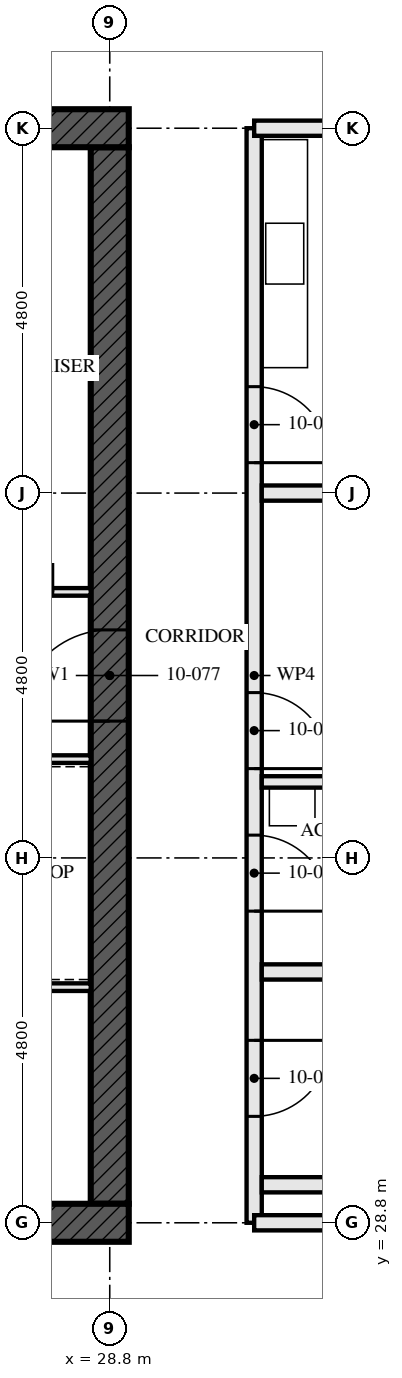
"""IFC4 building model, lengths in metres.
Left out: names, types, materials, properties, quantities, classifications, styles, units other than length and angle.
Written with IfcOpenShell. Run it as: python <this file> out.ifc"""

import sys

from ifc_helpers import new_model, si_unit, direction, frame, frame_2d, origin, place, context, subcontext, project, spatial, rectangle, extrude, element, fill, save


model = new_model("IFC4")
c1 = context("Model", 3, precision=1e-05, world=origin(), true_north=direction((0.0, 1.0)))
c2 = subcontext(c1, "Body", "Model", "MODEL_VIEW")
j1 = project(units=[si_unit("LENGTHUNIT", "METRE"), si_unit("PLANEANGLEUNIT", "RADIAN")], contexts=[c1])
p1 = place(None, origin())
s1 = spatial("IfcSite", under=j1, at=p1, CompositionType="ELEMENT")
p2 = place(p1, origin())
s2 = spatial("IfcBuilding", under=s1, at=p2, CompositionType="ELEMENT")
p3 = place(p2, frame((0.0, 0.0, 41.0)))
s3 = spatial("IfcBuildingStorey", under=s2, at=p3, CompositionType="ELEMENT", Elevation=41.0)
p4 = place(p3, frame((14.15, 28.8, -0.17), z_axis=(0.0, 0.0, 1.0), x_axis=(1.0, 0.0, 0.0)))
e1 = element("IfcWall", 1, at=p4, inside=s3, PredefinedType="SHEAR", context=c2, shape_type="SweptSolid", body=[
    extrude(rectangle(XDim=14.9, YDim=0.5, at=frame_2d((7.45, 0.0))), origin(), (0.0, 0.0, 1.0), 3.5),
])
p5 = place(p4, frame((6.85, 0.0, 0.17)))
e2 = element("IfcOpeningElement", 2, at=p5, cuts=e1, PredefinedType="OPENING", context=c2, shape_type="SweptSolid", body=[
    extrude(rectangle(XDim=1.2, YDim=2.1, at=frame_2d((0.6, 1.05))), frame((0.0, 0.26, 0.0), z_axis=(0.0, -1.0, 0.0), x_axis=(1.0, 0.0, 0.0)), (0.0, 0.0, 1.0), 0.521),
])
p6 = place(p3, frame((29.05, 43.2, -0.17), z_axis=(0.0, 0.0, 1.0), x_axis=(-1.0, 0.0, 0.0)))
e3 = element("IfcWall", 3, at=p6, inside=s3, PredefinedType="SHEAR", context=c2, shape_type="SweptSolid", body=[
    extrude(rectangle(XDim=14.9, YDim=0.5, at=frame_2d((7.45, 0.0))), origin(), (0.0, 0.0, 1.0), 3.5),
])
p7 = place(p6, frame((6.85, 0.0, 0.17)))
e4 = element("IfcOpeningElement", 4, at=p7, cuts=e3, PredefinedType="OPENING", context=c2, shape_type="SweptSolid", body=[
    extrude(rectangle(XDim=1.2, YDim=2.1, at=frame_2d((0.6, 1.05))), frame((0.0, 0.26, 0.0), z_axis=(0.0, -1.0, 0.0), x_axis=(1.0, 0.0, 0.0)), (0.0, 0.0, 1.0), 0.521),
])
p8 = place(p3, frame((28.8, 29.05, -0.17), z_axis=(0.0, 0.0, 1.0), x_axis=(0.0, 1.0, 0.0)))
e5 = element("IfcWall", 5, at=p8, inside=s3, PredefinedType="SHEAR", context=c2, shape_type="SweptSolid", body=[
    extrude(rectangle(XDim=13.9, YDim=0.5, at=frame_2d((6.95, 0.0))), origin(), (0.0, 0.0, 1.0), 3.5),
])
p9 = place(p8, frame((6.35, 0.0, 0.17)))
e6 = element("IfcOpeningElement", 6, at=p9, cuts=e5, PredefinedType="OPENING", context=c2, shape_type="SweptSolid", body=[
    extrude(rectangle(XDim=1.2, YDim=2.1, at=frame_2d((0.6, 1.05))), frame((0.0, 0.26, 0.0), z_axis=(0.0, -1.0, 0.0), x_axis=(1.0, 0.0, 0.0)), (0.0, 0.0, 1.0), 0.521),
])
for number, where, z_axis, x_axis in (
    (7, (35.5, 29.3, 0.0), (0.0, 0.0, 1.0), (-1.0, 0.0, 0.0)),
    (8, (35.5, 32.1, 0.0), (0.0, 0.0, 1.0), (-1.0, 0.0, 0.0)),
):
    element("IfcWall", number, at=place(p3, frame(where, z_axis=z_axis, x_axis=x_axis)), inside=s3, PredefinedType="SOLIDWALL", context=c2, shape_type="SweptSolid", body=[
        extrude(rectangle(XDim=4.7, YDim=0.2, at=frame_2d((2.35, 0.0))), origin(), (0.0, 0.0, 1.0), 2.99),
    ])
p10 = place(p3, frame((33.8, 34.6, 0.0), z_axis=(0.0, 0.0, 1.0), x_axis=(-1.0, 0.0, 0.0)))
e9 = element("IfcWall", 9, at=p10, inside=s3, PredefinedType="PARTITIONING", context=c2, shape_type="SweptSolid", body=[
    extrude(rectangle(XDim=3.0, YDim=0.15, at=frame_2d((1.5, 0.0))), origin(), (0.0, 0.0, 1.0), 3.33),
])
p11 = place(p3, frame((42.805, 38.4, 0.0), z_axis=(0.0, 0.0, 1.0), x_axis=(-1.0, 0.0, 0.0)))
e10 = element("IfcWall", 10, at=p11, inside=s3, PredefinedType="PARTITIONING", context=c2, shape_type="SweptSolid", body=[
    extrude(rectangle(XDim=12.005, YDim=0.2, at=frame_2d((6.002, 0.0))), origin(), (0.0, 0.0, 1.0), 2.55),
])
p12 = place(p3, frame((30.7, 28.8, 0.0), z_axis=(0.0, 0.0, 1.0), x_axis=(0.0, 1.0, 0.0)))
e11 = element("IfcWall", 11, at=p12, inside=s3, PredefinedType="PARTITIONING", context=c2, shape_type="SweptSolid", body=[
    extrude(rectangle(XDim=14.4, YDim=0.2, at=frame_2d((7.2, 0.0))), origin(), (0.0, 0.0, 1.0), 2.55),
])
p13 = place(p12, frame((1.4, 0.0, 0.0)))
e12 = element("IfcOpeningElement", 12, at=p13, cuts=e11, PredefinedType="OPENING", context=c2, shape_type="SweptSolid", body=[
    extrude(rectangle(XDim=1.0, YDim=2.1, at=frame_2d((0.5, 1.05))), frame((0.0, 0.111, 0.0), z_axis=(0.0, -1.0, 0.0), x_axis=(1.0, 0.0, 0.0)), (0.0, 0.0, 1.0), 0.221),
])
p14 = place(p12, frame((4.1, 0.0, 0.0)))
e13 = element("IfcOpeningElement", 13, at=p14, cuts=e11, PredefinedType="OPENING", context=c2, shape_type="SweptSolid", body=[
    extrude(rectangle(XDim=1.0, YDim=2.1, at=frame_2d((0.5, 1.05))), frame((0.0, 0.111, 0.0), z_axis=(0.0, -1.0, 0.0), x_axis=(1.0, 0.0, 0.0)), (0.0, 0.0, 1.0), 0.221),
])
p15 = place(p12, frame((5.975, 0.0, 0.0)))
e14 = element("IfcOpeningElement", 14, at=p15, cuts=e11, PredefinedType="OPENING", context=c2, shape_type="SweptSolid", body=[
    extrude(rectangle(XDim=1.0, YDim=2.1, at=frame_2d((0.5, 1.05))), frame((0.0, 0.111, 0.0), z_axis=(0.0, -1.0, 0.0), x_axis=(1.0, 0.0, 0.0)), (0.0, 0.0, 1.0), 0.221),
])
p16 = place(p12, frame((10.0, 0.0, 0.0)))
e15 = element("IfcOpeningElement", 15, at=p16, cuts=e11, PredefinedType="OPENING", context=c2, shape_type="SweptSolid", body=[
    extrude(rectangle(XDim=1.0, YDim=2.1, at=frame_2d((0.5, 1.05))), frame((0.0, 0.111, 0.0), z_axis=(0.0, -1.0, 0.0), x_axis=(1.0, 0.0, 0.0)), (0.0, 0.0, 1.0), 0.221),
])
p17 = place(p3, frame((23.05, 34.9, 0.0), z_axis=(0.0, 0.0, 1.0), x_axis=(1.0, 0.0, 0.0)))
e16 = element("IfcWall", 16, at=p17, inside=s3, PredefinedType="SOLIDWALL", context=c2, shape_type="SweptSolid", body=[
    extrude(rectangle(XDim=5.5, YDim=0.1, at=frame_2d((2.75, 0.0))), origin(), (0.0, 0.0, 1.0), 3.33),
])
p18 = place(p3, frame((22.65, 37.1, 0.0), z_axis=(0.0, 0.0, 1.0), x_axis=(1.0, 0.0, 0.0)))
e17 = element("IfcWall", 17, at=p18, inside=s3, PredefinedType="SOLIDWALL", context=c2, shape_type="SweptSolid", body=[
    extrude(rectangle(XDim=5.9, YDim=0.1, at=frame_2d((2.95, 0.0))), origin(), (0.0, 0.0, 1.0), 3.33),
])
p19 = place(p18, frame((3.1, 0.0, 0.0)))
e18 = element("IfcOpeningElement", 18, at=p19, cuts=e17, PredefinedType="OPENING", context=c2, shape_type="SweptSolid", body=[
    extrude(rectangle(XDim=1.0, YDim=2.1, at=frame_2d((0.5, 1.05))), frame((0.0, 0.061, 0.0), z_axis=(0.0, -1.0, 0.0), x_axis=(1.0, 0.0, 0.0)), (0.0, 0.0, 1.0), 0.121),
])
p20 = place(p18, frame((4.7, 0.0, 0.0)))
e19 = element("IfcOpeningElement", 19, at=p20, cuts=e17, PredefinedType="OPENING", context=c2, shape_type="SweptSolid", body=[
    extrude(rectangle(XDim=0.7, YDim=2.1, at=frame_2d((0.35, 1.05))), frame((0.0, 0.061, 0.0), z_axis=(0.0, -1.0, 0.0), x_axis=(1.0, 0.0, 0.0)), (0.0, 0.0, 1.0), 0.121),
])
p21 = place(p3, frame((23.15, 31.9, 0.0), z_axis=(0.0, 0.0, 1.0), x_axis=(1.0, 0.0, 0.0)))
e20 = element("IfcWall", 20, at=p21, inside=s3, PredefinedType="SOLIDWALL", context=c2, shape_type="SweptSolid", body=[
    extrude(rectangle(XDim=5.4, YDim=0.1, at=frame_2d((2.7, 0.0))), origin(), (0.0, 0.0, 1.0), 3.33),
])
for number, where, z_axis, x_axis in (
    (21, (33.205, 28.8, 0.0), (0.0, 0.0, 1.0), (-1.0, 0.0, 0.0)),
    (22, (33.205, 43.2, 0.0), (0.0, 0.0, 1.0), (-1.0, 0.0, 0.0)),
):
    element("IfcWall", number, at=place(p3, frame(where, z_axis=z_axis, x_axis=x_axis)), inside=s3, PredefinedType="PARTITIONING", context=c2, shape_type="SweptSolid", body=[
        extrude(rectangle(XDim=2.505, YDim=0.2, at=frame_2d((1.252, 0.0))), origin(), (0.0, 0.0, 1.0), 2.32),
    ])
p22 = place(p13, frame((1.0, 0.0, 0.0), z_axis=(0.0, 0.0, 1.0), x_axis=(-1.0, 0.0, 0.0)))
e23 = element("IfcDoor", 23, at=p22, inside=s3, OperationType="SINGLE_SWING_RIGHT", PredefinedType="DOOR", context=c2, shape_type="SweptSolid", body=[
    extrude(rectangle(XDim=1.0, YDim=2.1, at=frame_2d((0.5, 1.05))), frame((0.0, 0.032, 0.0), z_axis=(0.0, -1.0, 0.0), x_axis=(1.0, 0.0, 0.0)), (0.0, 0.0, 1.0), 0.064),
])
fill(e12, e23)
p23 = place(p14, frame((1.0, 0.0, 0.0), z_axis=(0.0, 0.0, 1.0), x_axis=(-1.0, 0.0, 0.0)))
e24 = element("IfcDoor", 24, at=p23, inside=s3, OperationType="SINGLE_SWING_LEFT", PredefinedType="DOOR", context=c2, shape_type="SweptSolid", body=[
    extrude(rectangle(XDim=1.0, YDim=2.1, at=frame_2d((0.5, 1.05))), frame((0.0, 0.027, 0.0), z_axis=(0.0, -1.0, 0.0), x_axis=(1.0, 0.0, 0.0)), (0.0, 0.0, 1.0), 0.054),
])
fill(e13, e24)
p24 = place(p15, frame((1.0, 0.0, 0.0), z_axis=(0.0, 0.0, 1.0), x_axis=(-1.0, 0.0, 0.0)))
e25 = element("IfcDoor", 25, at=p24, inside=s3, OperationType="SINGLE_SWING_LEFT", PredefinedType="DOOR", context=c2, shape_type="SweptSolid", body=[
    extrude(rectangle(XDim=1.0, YDim=2.1, at=frame_2d((0.5, 1.05))), frame((0.0, 0.027, 0.0), z_axis=(0.0, -1.0, 0.0), x_axis=(1.0, 0.0, 0.0)), (0.0, 0.0, 1.0), 0.054),
])
fill(e14, e25)
p25 = place(p16, frame((1.0, 0.0, 0.0), z_axis=(0.0, 0.0, 1.0), x_axis=(-1.0, 0.0, 0.0)))
e26 = element("IfcDoor", 26, at=p25, inside=s3, OperationType="SINGLE_SWING_LEFT", PredefinedType="DOOR", context=c2, shape_type="SweptSolid", body=[
    extrude(rectangle(XDim=1.0, YDim=2.1, at=frame_2d((0.5, 1.05))), frame((0.0, 0.027, 0.0), z_axis=(0.0, -1.0, 0.0), x_axis=(1.0, 0.0, 0.0)), (0.0, 0.0, 1.0), 0.054),
])
fill(e15, e26)
p26 = place(p9, origin())
e27 = element("IfcDoor", 27, at=p26, inside=s3, OperationType="SINGLE_SWING_LEFT", PredefinedType="DOOR", context=c2, shape_type="SweptSolid", body=[
    extrude(rectangle(XDim=1.2, YDim=2.1, at=frame_2d((0.6, 1.05))), frame((0.0, 0.027, 0.0), z_axis=(0.0, -1.0, 0.0), x_axis=(1.0, 0.0, 0.0)), (0.0, 0.0, 1.0), 0.054),
])
fill(e6, e27)
save(model, sys.argv[1])
